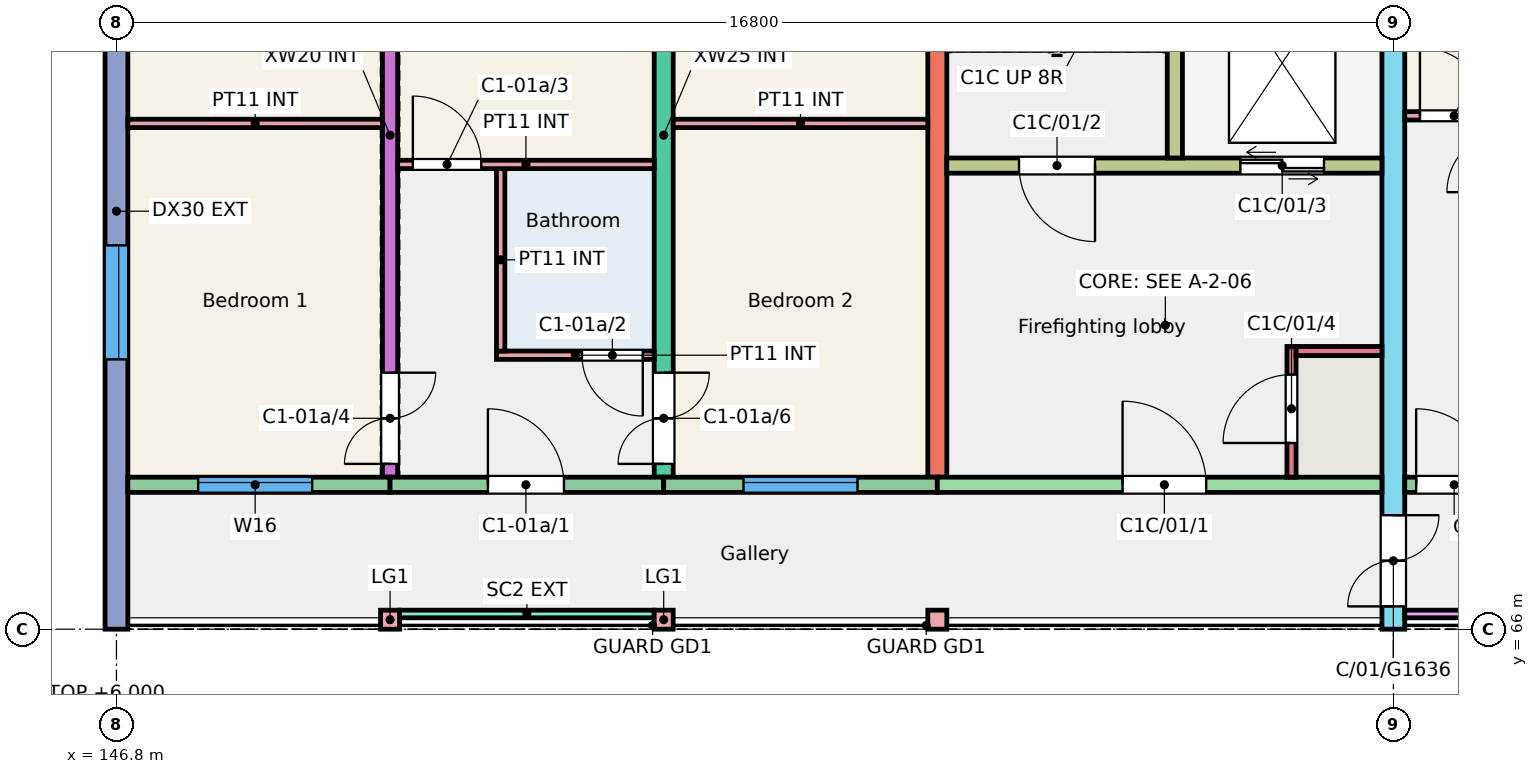
"""IFC4 building model, lengths in metres.
Left out: names, types, materials, properties, quantities, classifications, styles, units other than length and angle.
Written with IfcOpenShell. Run it as: python <this file> out.ifc"""

import sys

from ifc_helpers import new_model, si_unit, direction, frame, frame_2d, origin, origin_2d, place, context, subcontext, project, spatial, rectangle, extrude, element, fill, save


model = new_model("IFC4")
c1 = context("Model", 3, precision=1e-05, world=origin(), true_north=direction((0.0, 1.0)))
c2 = subcontext(c1, "Body", "Model", "MODEL_VIEW")
j1 = project(units=[si_unit("LENGTHUNIT", "METRE"), si_unit("PLANEANGLEUNIT", "RADIAN")], contexts=[c1])
p1 = place(None, origin())
s1 = spatial("IfcSite", under=j1, at=p1, CompositionType="ELEMENT")
p2 = place(p1, origin())
s2 = spatial("IfcBuilding", under=s1, at=p2, CompositionType="ELEMENT")
p3 = place(p2, frame((0.0, 0.0, 3.0)))
s3 = spatial("IfcBuildingStorey", under=s2, at=p3, CompositionType="ELEMENT", Elevation=3.0)
p4 = place(p3, frame((146.8, 66.0, 0.0), z_axis=(0.0, 0.0, 1.0), x_axis=(0.0, 1.0, 0.0)))
e1 = element("IfcWall", 1, at=p4, inside=s3, PredefinedType="SHEAR", context=c2, shape_type="SweptSolid", body=[
    extrude(rectangle(XDim=11.0, YDim=0.3, at=frame_2d((5.5, 0.0))), origin(), (0.0, 0.0, 1.0), 3.0),
])
p5 = place(p4, frame((3.55, 0.0, 0.9)))
e2 = element("IfcOpeningElement", 2, at=p5, cuts=e1, PredefinedType="OPENING", context=c2, shape_type="SweptSolid", body=[
    extrude(rectangle(XDim=1.5, YDim=1.5, at=frame_2d((0.75, 0.75))), frame((0.0, 0.16, 0.0), z_axis=(0.0, -1.0, 0.0), x_axis=(1.0, 0.0, 0.0)), (0.0, 0.0, 1.0), 0.32),
])
p6 = place(p4, frame((8.105, 0.0, 0.9)))
e3 = element("IfcOpeningElement", 3, at=p6, cuts=e1, PredefinedType="OPENING", context=c2, shape_type="SweptSolid", body=[
    extrude(rectangle(XDim=1.5, YDim=1.5, at=frame_2d((0.75, 0.75))), frame((0.0, 0.16, 0.0), z_axis=(0.0, -1.0, 0.0), x_axis=(1.0, 0.0, 0.0)), (0.0, 0.0, 1.0), 0.32),
])
p7 = place(p3, frame((150.4, 68.0, 0.0), z_axis=(0.0, 0.0, 1.0), x_axis=(0.0, 1.0, 0.0)))
e4 = element("IfcWall", 4, at=p7, inside=s3, PredefinedType="SHEAR", context=c2, shape_type="SweptSolid", body=[
    extrude(rectangle(XDim=9.0, YDim=0.2, at=frame_2d((4.5, 0.0))), origin(), (0.0, 0.0, 1.0), 3.0),
])
p8 = place(p7, frame((0.175, 0.0, 0.0)))
e5 = element("IfcOpeningElement", 5, at=p8, cuts=e4, PredefinedType="OPENING", context=c2, shape_type="SweptSolid", body=[
    extrude(rectangle(XDim=1.2, YDim=2.1, at=frame_2d((0.6, 1.05))), frame((0.0, 0.11, 0.0), z_axis=(0.0, -1.0, 0.0), x_axis=(1.0, 0.0, 0.0)), (0.0, 0.0, 1.0), 0.22),
])
p9 = place(p7, frame((6.4, 0.0, 0.0)))
e6 = element("IfcOpeningElement", 6, at=p9, cuts=e4, PredefinedType="OPENING", context=c2, shape_type="SweptSolid", body=[
    extrude(rectangle(XDim=1.2, YDim=2.1, at=frame_2d((0.6, 1.05))), frame((0.0, 0.11, 0.0), z_axis=(0.0, -1.0, 0.0), x_axis=(1.0, 0.0, 0.0)), (0.0, 0.0, 1.0), 0.22),
])
p10 = place(p3, frame((154.0, 68.0, 0.0), z_axis=(0.0, 0.0, 1.0), x_axis=(0.0, 1.0, 0.0)))
e7 = element("IfcWall", 7, at=p10, inside=s3, PredefinedType="SHEAR", context=c2, shape_type="SweptSolid", body=[
    extrude(rectangle(XDim=9.0, YDim=0.25, at=frame_2d((4.5, 0.0))), origin(), (0.0, 0.0, 1.0), 3.0),
])
p11 = place(p10, frame((0.175, 0.0, 0.0)))
e8 = element("IfcOpeningElement", 8, at=p11, cuts=e7, PredefinedType="OPENING", context=c2, shape_type="SweptSolid", body=[
    extrude(rectangle(XDim=1.2, YDim=2.1, at=frame_2d((0.6, 1.05))), frame((0.0, 0.135, 0.0), z_axis=(0.0, -1.0, 0.0), x_axis=(1.0, 0.0, 0.0)), (0.0, 0.0, 1.0), 0.27),
])
p12 = place(p10, frame((6.4, 0.0, 0.0)))
e9 = element("IfcOpeningElement", 9, at=p12, cuts=e7, PredefinedType="OPENING", context=c2, shape_type="SweptSolid", body=[
    extrude(rectangle(XDim=1.2, YDim=2.1, at=frame_2d((0.6, 1.05))), frame((0.0, 0.135, 0.0), z_axis=(0.0, -1.0, 0.0), x_axis=(1.0, 0.0, 0.0)), (0.0, 0.0, 1.0), 0.27),
])
p13 = place(p3, frame((157.6, 68.0, 0.0), z_axis=(0.0, 0.0, 1.0), x_axis=(0.0, 1.0, 0.0)))
e10 = element("IfcWall", 10, at=p13, inside=s3, PredefinedType="SHEAR", context=c2, shape_type="SweptSolid", body=[
    extrude(rectangle(XDim=9.0, YDim=0.25, at=frame_2d((4.5, 0.0))), origin(), (0.0, 0.0, 1.0), 3.0),
])
p14 = place(p3, frame((163.6, 66.0, 0.0), z_axis=(0.0, 0.0, 1.0), x_axis=(0.0, 1.0, 0.0)))
e11 = element("IfcWall", 11, at=p14, inside=s3, PredefinedType="SHEAR", context=c2, shape_type="SweptSolid", body=[
    extrude(rectangle(XDim=11.0, YDim=0.3, at=frame_2d((5.5, 0.0))), origin(), (0.0, 0.0, 1.0), 3.0),
])
p15 = place(p14, frame((0.3, 0.0, 0.0)))
e12 = element("IfcOpeningElement", 12, at=p15, cuts=e11, PredefinedType="OPENING", context=c2, shape_type="SweptSolid", body=[
    extrude(rectangle(XDim=1.2, YDim=2.1, at=frame_2d((0.6, 1.05))), frame((0.0, 0.16, 0.0), z_axis=(0.0, -1.0, 0.0), x_axis=(1.0, 0.0, 0.0)), (0.0, 0.0, 1.0), 0.32),
])
p16 = place(p3, frame((146.95, 67.9, 0.0), z_axis=(0.0, 0.0, 1.0), x_axis=(1.0, 0.0, 0.0)))
e13 = element("IfcWall", 13, at=p16, inside=s3, PredefinedType="SOLIDWALL", context=c2, shape_type="SweptSolid", body=[
    extrude(rectangle(XDim=3.45, YDim=0.2, at=frame_2d((1.725, 0.0))), origin(), (0.0, 0.0, 1.0), 3.0),
])
p17 = place(p16, frame((0.925, 0.0, 0.9)))
e14 = element("IfcOpeningElement", 14, at=p17, cuts=e13, PredefinedType="OPENING", context=c2, shape_type="SweptSolid", body=[
    extrude(rectangle(XDim=1.5, YDim=1.5, at=frame_2d((0.75, 0.75))), frame((0.0, 0.11, 0.0), z_axis=(0.0, -1.0, 0.0), x_axis=(1.0, 0.0, 0.0)), (0.0, 0.0, 1.0), 0.22),
])
p18 = place(p3, frame((150.4, 67.9, 0.0), z_axis=(0.0, 0.0, 1.0), x_axis=(1.0, 0.0, 0.0)))
e15 = element("IfcWall", 15, at=p18, inside=s3, PredefinedType="SOLIDWALL", context=c2, shape_type="SweptSolid", body=[
    extrude(rectangle(XDim=3.6, YDim=0.2, at=frame_2d((1.8, 0.0))), origin(), (0.0, 0.0, 1.0), 3.0),
])
p19 = place(p18, frame((1.288, 0.0, 0.0)))
e16 = element("IfcOpeningElement", 16, at=p19, cuts=e15, PredefinedType="OPENING", context=c2, shape_type="SweptSolid", body=[
    extrude(rectangle(XDim=1.0, YDim=2.1, at=frame_2d((0.5, 1.05))), frame((0.0, 0.11, 0.0), z_axis=(0.0, -1.0, 0.0), x_axis=(1.0, 0.0, 0.0)), (0.0, 0.0, 1.0), 0.22),
])
p20 = place(p3, frame((154.0, 67.9, 0.0), z_axis=(0.0, 0.0, 1.0), x_axis=(1.0, 0.0, 0.0)))
e17 = element("IfcWall", 17, at=p20, inside=s3, PredefinedType="SOLIDWALL", context=c2, shape_type="SweptSolid", body=[
    extrude(rectangle(XDim=3.6, YDim=0.2, at=frame_2d((1.8, 0.0))), origin(), (0.0, 0.0, 1.0), 3.0),
])
p21 = place(p20, frame((1.05, 0.0, 0.9)))
e18 = element("IfcOpeningElement", 18, at=p21, cuts=e17, PredefinedType="OPENING", context=c2, shape_type="SweptSolid", body=[
    extrude(rectangle(XDim=1.5, YDim=1.5, at=frame_2d((0.75, 0.75))), frame((0.0, 0.11, 0.0), z_axis=(0.0, -1.0, 0.0), x_axis=(1.0, 0.0, 0.0)), (0.0, 0.0, 1.0), 0.22),
])
p22 = place(p3, frame((157.6, 67.9, 0.0), z_axis=(0.0, 0.0, 1.0), x_axis=(1.0, 0.0, 0.0)))
e19 = element("IfcWall", 19, at=p22, inside=s3, PredefinedType="SHEAR", context=c2, shape_type="SweptSolid", body=[
    extrude(rectangle(XDim=5.85, YDim=0.2, at=frame_2d((2.925, 0.0))), origin(), (0.0, 0.0, 1.0), 3.0),
])
p23 = place(p22, frame((2.438, 0.0, 0.0)))
e20 = element("IfcOpeningElement", 20, at=p23, cuts=e19, PredefinedType="OPENING", context=c2, shape_type="SweptSolid", body=[
    extrude(rectangle(XDim=1.1, YDim=2.1, at=frame_2d((0.55, 1.05))), frame((0.0, 0.11, 0.0), z_axis=(0.0, -1.0, 0.0), x_axis=(1.0, 0.0, 0.0)), (0.0, 0.0, 1.0), 0.22),
])
p24 = place(p3, frame((157.725, 72.1, 0.0), z_axis=(0.0, 0.0, 1.0), x_axis=(1.0, 0.0, 0.0)))
e21 = element("IfcWall", 21, at=p24, inside=s3, PredefinedType="SHEAR", context=c2, shape_type="SweptSolid", body=[
    extrude(rectangle(XDim=5.725, YDim=0.2, at=frame_2d((2.862, 0.0))), origin(), (0.0, 0.0, 1.0), 3.0),
])
p25 = place(p24, frame((0.95, 0.0, 0.0)))
e22 = element("IfcOpeningElement", 22, at=p25, cuts=e21, PredefinedType="OPENING", context=c2, shape_type="SweptSolid", body=[
    extrude(rectangle(XDim=1.0, YDim=2.1, at=frame_2d((0.5, 1.05))), frame((0.0, 0.11, 0.0), z_axis=(0.0, -1.0, 0.0), x_axis=(1.0, 0.0, 0.0)), (0.0, 0.0, 1.0), 0.22),
])
p26 = place(p24, frame((3.863, 0.0, 0.0)))
e23 = element("IfcOpeningElement", 23, at=p26, cuts=e21, PredefinedType="OPENING", context=c2, shape_type="SweptSolid", body=[
    extrude(rectangle(XDim=1.1, YDim=2.1, at=frame_2d((0.55, 1.05))), frame((0.0, 0.11, 0.0), z_axis=(0.0, -1.0, 0.0), x_axis=(1.0, 0.0, 0.0)), (0.0, 0.0, 1.0), 0.22),
])
p27 = place(p3, frame((160.725, 72.2, 0.0), z_axis=(0.0, 0.0, 1.0), x_axis=(0.0, 1.0, 0.0)))
e24 = element("IfcWall", 24, at=p27, inside=s3, PredefinedType="SHEAR", context=c2, shape_type="SweptSolid", body=[
    extrude(rectangle(XDim=4.8, YDim=0.2, at=frame_2d((2.4, 0.0))), origin(), (0.0, 0.0, 1.0), 3.0),
])
p28 = place(p3, frame((162.26, 68.0, 0.0), z_axis=(0.0, 0.0, 1.0), x_axis=(0.0, 1.0, 0.0)))
e25 = element("IfcWall", 25, at=p28, inside=s3, PredefinedType="SHEAR", context=c2, shape_type="SweptSolid", body=[
    extrude(rectangle(XDim=1.72, YDim=0.12, at=frame_2d((0.86, 0.0))), origin(), (0.0, 0.0, 1.0), 3.0),
])
p29 = place(p28, frame((0.45, 0.0, 0.0)))
e26 = element("IfcOpeningElement", 26, at=p29, cuts=e25, PredefinedType="OPENING", context=c2, shape_type="SweptSolid", body=[
    extrude(rectangle(XDim=0.9, YDim=2.1, at=frame_2d((0.45, 1.05))), frame((0.0, 0.07, 0.0), z_axis=(0.0, -1.0, 0.0), x_axis=(1.0, 0.0, 0.0)), (0.0, 0.0, 1.0), 0.14),
])
p30 = place(p3, frame((162.32, 69.66, 0.0), z_axis=(0.0, 0.0, 1.0), x_axis=(1.0, 0.0, 0.0)))
e27 = element("IfcWall", 27, at=p30, inside=s3, PredefinedType="SHEAR", context=c2, shape_type="SweptSolid", body=[
    extrude(rectangle(XDim=1.13, YDim=0.12, at=frame_2d((0.565, 0.0))), origin(), (0.0, 0.0, 1.0), 3.0),
])
p31 = place(p3, frame((163.75, 67.9, 0.0), z_axis=(0.0, 0.0, 1.0), x_axis=(1.0, 0.0, 0.0)))
e28 = element("IfcWall", 28, at=p31, inside=s3, PredefinedType="SOLIDWALL", context=c2, shape_type="SweptSolid", body=[
    extrude(rectangle(XDim=3.45, YDim=0.2, at=frame_2d((1.725, 0.0))), origin(), (0.0, 0.0, 1.0), 3.0),
])
p32 = place(p31, frame((1.78, 0.0, 1.1)))
e29 = element("IfcOpeningElement", 29, at=p32, cuts=e28, PredefinedType="OPENING", context=c2, shape_type="SweptSolid", body=[
    extrude(rectangle(XDim=1.2, YDim=1.3, at=frame_2d((0.6, 0.65))), frame((0.0, 0.11, 0.0), z_axis=(0.0, -1.0, 0.0), x_axis=(1.0, 0.0, 0.0)), (0.0, 0.0, 1.0), 0.22),
])
p33 = place(p31, frame((0.15, 0.0, 0.0)))
e30 = element("IfcOpeningElement", 30, at=p33, cuts=e28, PredefinedType="OPENING", context=c2, shape_type="SweptSolid", body=[
    extrude(rectangle(XDim=1.0, YDim=2.1, at=frame_2d((0.5, 1.05))), frame((0.0, 0.11, 0.0), z_axis=(0.0, -1.0, 0.0), x_axis=(1.0, 0.0, 0.0)), (0.0, 0.0, 1.0), 0.22),
])
for number, where, z_axis, x_axis in (
    (31, (150.4, 66.125, 0.0), (0.0, 0.0, 1.0), (1.0, 0.0, 0.0)),
    (32, (154.0, 66.125, 0.0), (0.0, 0.0, 1.0), (1.0, 0.0, 0.0)),
    (33, (157.6, 66.125, 0.0), (0.0, 0.0, 1.0), (1.0, 0.0, 0.0)),
):
    element("IfcColumn", number, at=place(p3, frame(where, z_axis=z_axis, x_axis=x_axis)), inside=s3, PredefinedType="COLUMN", context=c2, shape_type="SweptSolid", body=[
        extrude(rectangle(XDim=0.25, YDim=0.25, at=origin_2d()), origin(), (0.0, 0.0, 1.0), 3.0),
    ])
p34 = place(p3, frame((150.525, 66.2, 0.0), z_axis=(0.0, 0.0, 1.0), x_axis=(1.0, 0.0, 0.0)))
e34 = element("IfcWall", 34, at=p34, inside=s3, PredefinedType="SOLIDWALL", context=c2, shape_type="SweptSolid", body=[
    extrude(rectangle(XDim=3.35, YDim=0.1, at=frame_2d((1.675, 0.0))), origin(), (0.0, 0.0, 1.0), 2.45),
])
p35 = place(p3, frame((163.75, 66.2, 0.0), z_axis=(0.0, 0.0, 1.0), x_axis=(1.0, 0.0, 0.0)))
e35 = element("IfcWall", 35, at=p35, inside=s3, PredefinedType="SOLIDWALL", context=c2, shape_type="SweptSolid", body=[
    extrude(rectangle(XDim=3.325, YDim=0.1, at=frame_2d((1.663, 0.0))), origin(), (0.0, 0.0, 1.0), 2.45),
])
p36 = place(p3, frame((151.8, 69.605, 0.0), z_axis=(0.0, 0.0, 1.0), x_axis=(1.0, 0.0, 0.0)))
e36 = element("IfcWall", 36, at=p36, inside=s3, PredefinedType="PARTITIONING", context=c2, shape_type="SweptSolid", body=[
    extrude(rectangle(XDim=2.075, YDim=0.11, at=frame_2d((1.038, 0.0))), origin(), (0.0, 0.0, 1.0), 2.8),
])
p37 = place(p36, frame((1.125, 0.0, 0.0)))
e37 = element("IfcOpeningElement", 37, at=p37, cuts=e36, PredefinedType="OPENING", context=c2, shape_type="SweptSolid", body=[
    extrude(rectangle(XDim=0.8, YDim=2.1, at=frame_2d((0.4, 1.05))), frame((0.0, 0.065, 0.0), z_axis=(0.0, -1.0, 0.0), x_axis=(1.0, 0.0, 0.0)), (0.0, 0.0, 1.0), 0.13),
])
p38 = place(p3, frame((151.855, 69.66, 0.0), z_axis=(0.0, 0.0, 1.0), x_axis=(0.0, 1.0, 0.0)))
e38 = element("IfcWall", 38, at=p38, inside=s3, PredefinedType="PARTITIONING", context=c2, shape_type="SweptSolid", body=[
    extrude(rectangle(XDim=2.4, YDim=0.11, at=frame_2d((1.2, 0.0))), origin(), (0.0, 0.0, 1.0), 2.8),
])
p39 = place(p3, frame((150.5, 72.115, 0.0), z_axis=(0.0, 0.0, 1.0), x_axis=(1.0, 0.0, 0.0)))
e39 = element("IfcWall", 39, at=p39, inside=s3, PredefinedType="PARTITIONING", context=c2, shape_type="SweptSolid", body=[
    extrude(rectangle(XDim=3.375, YDim=0.11, at=frame_2d((1.688, 0.0))), origin(), (0.0, 0.0, 1.0), 2.8),
])
p40 = place(p39, frame((0.2, 0.0, 0.0)))
e40 = element("IfcOpeningElement", 40, at=p40, cuts=e39, PredefinedType="OPENING", context=c2, shape_type="SweptSolid", body=[
    extrude(rectangle(XDim=0.9, YDim=2.1, at=frame_2d((0.45, 1.05))), frame((0.0, 0.065, 0.0), z_axis=(0.0, -1.0, 0.0), x_axis=(1.0, 0.0, 0.0)), (0.0, 0.0, 1.0), 0.13),
])
for number, where, z_axis, x_axis in (
    (41, (146.95, 72.655, 0.0), (0.0, 0.0, 1.0), (1.0, 0.0, 0.0)),
    (42, (154.125, 72.655, 0.0), (0.0, 0.0, 1.0), (1.0, 0.0, 0.0)),
):
    element("IfcWall", number, at=place(p3, frame(where, z_axis=z_axis, x_axis=x_axis)), inside=s3, PredefinedType="PARTITIONING", context=c2, shape_type="SweptSolid", body=[
        extrude(rectangle(XDim=3.35, YDim=0.11, at=frame_2d((1.675, 0.0))), origin(), (0.0, 0.0, 1.0), 2.8),
    ])
p41 = place(p3, frame((163.75, 72.755, 0.0), z_axis=(0.0, 0.0, 1.0), x_axis=(1.0, 0.0, 0.0)))
e43 = element("IfcWall", 43, at=p41, inside=s3, PredefinedType="PARTITIONING", context=c2, shape_type="SweptSolid", body=[
    extrude(rectangle(XDim=3.35, YDim=0.11, at=frame_2d((1.675, 0.0))), origin(), (0.0, 0.0, 1.0), 2.8),
])
p42 = place(p41, frame((0.2, 0.0, 0.0)))
e44 = element("IfcOpeningElement", 44, at=p42, cuts=e43, PredefinedType="OPENING", context=c2, shape_type="SweptSolid", body=[
    extrude(rectangle(XDim=0.9, YDim=2.1, at=frame_2d((0.45, 1.05))), frame((0.0, 0.065, 0.0), z_axis=(0.0, -1.0, 0.0), x_axis=(1.0, 0.0, 0.0)), (0.0, 0.0, 1.0), 0.13),
])
p43 = place(p17, origin())
e45 = element("IfcWindow", 45, at=p43, inside=s3, PartitioningType="SINGLE_PANEL", PredefinedType="WINDOW", context=c2, shape_type="SweptSolid", body=[
    extrude(rectangle(XDim=1.5, YDim=1.5, at=frame_2d((0.75, 0.75))), frame((0.0, 0.06, 0.0), z_axis=(0.0, -1.0, 0.0), x_axis=(1.0, 0.0, 0.0)), (0.0, 0.0, 1.0), 0.06),
])
fill(e14, e45)
p44 = place(p21, origin())
e46 = element("IfcWindow", 46, at=p44, inside=s3, PartitioningType="SINGLE_PANEL", PredefinedType="WINDOW", context=c2, shape_type="SweptSolid", body=[
    extrude(rectangle(XDim=1.5, YDim=1.5, at=frame_2d((0.75, 0.75))), frame((0.0, 0.06, 0.0), z_axis=(0.0, -1.0, 0.0), x_axis=(1.0, 0.0, 0.0)), (0.0, 0.0, 1.0), 0.06),
])
fill(e18, e46)
p45 = place(p5, origin())
e47 = element("IfcWindow", 47, at=p45, inside=s3, PartitioningType="SINGLE_PANEL", PredefinedType="WINDOW", context=c2, shape_type="SweptSolid", body=[
    extrude(rectangle(XDim=1.5, YDim=1.5, at=frame_2d((0.75, 0.75))), frame((0.0, 0.0, 0.0), z_axis=(0.0, -1.0, 0.0), x_axis=(1.0, 0.0, 0.0)), (0.0, 0.0, 1.0), 0.06),
])
fill(e2, e47)
p46 = place(p19, origin())
e48 = element("IfcDoor", 48, at=p46, inside=s3, OperationType="SINGLE_SWING_LEFT", PredefinedType="DOOR", context=c2, shape_type="SweptSolid", body=[
    extrude(rectangle(XDim=1.0, YDim=2.1, at=frame_2d((0.5, 1.05))), frame((0.0, 0.025, 0.0), z_axis=(0.0, -1.0, 0.0), x_axis=(1.0, 0.0, 0.0)), (0.0, 0.0, 1.0), 0.05),
])
fill(e16, e48)
p47 = place(p37, origin())
e49 = element("IfcDoor", 49, at=p47, inside=s3, OperationType="SINGLE_SWING_RIGHT", PredefinedType="DOOR", context=c2, shape_type="SweptSolid", body=[
    extrude(rectangle(XDim=0.8, YDim=2.1, at=frame_2d((0.4, 1.05))), frame((0.0, 0.025, 0.0), z_axis=(0.0, -1.0, 0.0), x_axis=(1.0, 0.0, 0.0)), (0.0, 0.0, 1.0), 0.05),
])
fill(e37, e49)
p48 = place(p40, origin())
e50 = element("IfcDoor", 50, at=p48, inside=s3, OperationType="SINGLE_SWING_LEFT", PredefinedType="DOOR", context=c2, shape_type="SweptSolid", body=[
    extrude(rectangle(XDim=0.9, YDim=2.1, at=frame_2d((0.45, 1.05))), frame((0.0, 0.025, 0.0), z_axis=(0.0, -1.0, 0.0), x_axis=(1.0, 0.0, 0.0)), (0.0, 0.0, 1.0), 0.05),
])
fill(e40, e50)
p49 = place(p8, origin())
e51 = element("IfcDoor", 51, at=p49, inside=s3, OperationType="DOUBLE_DOOR_SINGLE_SWING", PredefinedType="DOOR", context=c2, shape_type="SweptSolid", body=[
    extrude(rectangle(XDim=1.2, YDim=2.1, at=frame_2d((0.6, 1.05))), frame((0.0, 0.025, 0.0), z_axis=(0.0, -1.0, 0.0), x_axis=(1.0, 0.0, 0.0)), (0.0, 0.0, 1.0), 0.05),
])
fill(e5, e51)
p50 = place(p11, origin())
e52 = element("IfcDoor", 52, at=p50, inside=s3, OperationType="DOUBLE_DOOR_SINGLE_SWING", PredefinedType="DOOR", context=c2, shape_type="SweptSolid", body=[
    extrude(rectangle(XDim=1.2, YDim=2.1, at=frame_2d((0.6, 1.05))), frame((0.0, 0.025, 0.0), z_axis=(0.0, -1.0, 0.0), x_axis=(1.0, 0.0, 0.0)), (0.0, 0.0, 1.0), 0.05),
])
fill(e8, e52)
p51 = place(p33, origin())
e53 = element("IfcDoor", 53, at=p51, inside=s3, OperationType="SINGLE_SWING_LEFT", PredefinedType="DOOR", context=c2, shape_type="SweptSolid", body=[
    extrude(rectangle(XDim=1.0, YDim=2.1, at=frame_2d((0.5, 1.05))), frame((0.0, 0.025, 0.0), z_axis=(0.0, -1.0, 0.0), x_axis=(1.0, 0.0, 0.0)), (0.0, 0.0, 1.0), 0.05),
])
fill(e30, e53)
p52 = place(p42, origin())
e54 = element("IfcDoor", 54, at=p52, inside=s3, OperationType="SINGLE_SWING_LEFT", PredefinedType="DOOR", context=c2, shape_type="SweptSolid", body=[
    extrude(rectangle(XDim=0.9, YDim=2.1, at=frame_2d((0.45, 1.05))), frame((0.0, 0.025, 0.0), z_axis=(0.0, -1.0, 0.0), x_axis=(1.0, 0.0, 0.0)), (0.0, 0.0, 1.0), 0.05),
])
fill(e44, e54)
p53 = place(p23, origin())
e55 = element("IfcDoor", 55, at=p53, inside=s3, OperationType="SINGLE_SWING_LEFT", PredefinedType="DOOR", context=c2, shape_type="SweptSolid", body=[
    extrude(rectangle(XDim=1.1, YDim=2.1, at=frame_2d((0.55, 1.05))), frame((0.0, 0.025, 0.0), z_axis=(0.0, -1.0, 0.0), x_axis=(1.0, 0.0, 0.0)), (0.0, 0.0, 1.0), 0.05),
])
fill(e20, e55)
p54 = place(p25, origin())
e56 = element("IfcDoor", 56, at=p54, inside=s3, OperationType="SINGLE_SWING_RIGHT", PredefinedType="DOOR", context=c2, shape_type="SweptSolid", body=[
    extrude(rectangle(XDim=1.0, YDim=2.1, at=frame_2d((0.5, 1.05))), frame((0.0, 0.025, 0.0), z_axis=(0.0, -1.0, 0.0), x_axis=(1.0, 0.0, 0.0)), (0.0, 0.0, 1.0), 0.05),
])
fill(e22, e56)
p55 = place(p26, origin())
e57 = element("IfcDoor", 57, at=p55, inside=s3, OperationType="DOUBLE_DOOR_SLIDING", PredefinedType="DOOR", context=c2, shape_type="SweptSolid", body=[
    extrude(rectangle(XDim=1.1, YDim=2.1, at=frame_2d((0.55, 1.05))), frame((0.0, 0.025, 0.0), z_axis=(0.0, -1.0, 0.0), x_axis=(1.0, 0.0, 0.0)), (0.0, 0.0, 1.0), 0.05),
])
fill(e23, e57)
p56 = place(p29, origin())
e58 = element("IfcDoor", 58, at=p56, inside=s3, OperationType="SINGLE_SWING_LEFT", PredefinedType="DOOR", context=c2, shape_type="SweptSolid", body=[
    extrude(rectangle(XDim=0.9, YDim=2.1, at=frame_2d((0.45, 1.05))), frame((0.0, 0.025, 0.0), z_axis=(0.0, -1.0, 0.0), x_axis=(1.0, 0.0, 0.0)), (0.0, 0.0, 1.0), 0.05),
])
fill(e26, e58)
p57 = place(p15, origin())
e59 = element("IfcDoor", 59, at=p57, inside=s3, OperationType="DOUBLE_DOOR_SINGLE_SWING", PredefinedType="DOOR", context=c2, shape_type="SweptSolid", body=[
    extrude(rectangle(XDim=1.2, YDim=2.1, at=frame_2d((0.6, 1.05))), frame((0.0, 0.025, 0.0), z_axis=(0.0, -1.0, 0.0), x_axis=(1.0, 0.0, 0.0)), (0.0, 0.0, 1.0), 0.05),
])
fill(e12, e59)
save(model, sys.argv[1])
